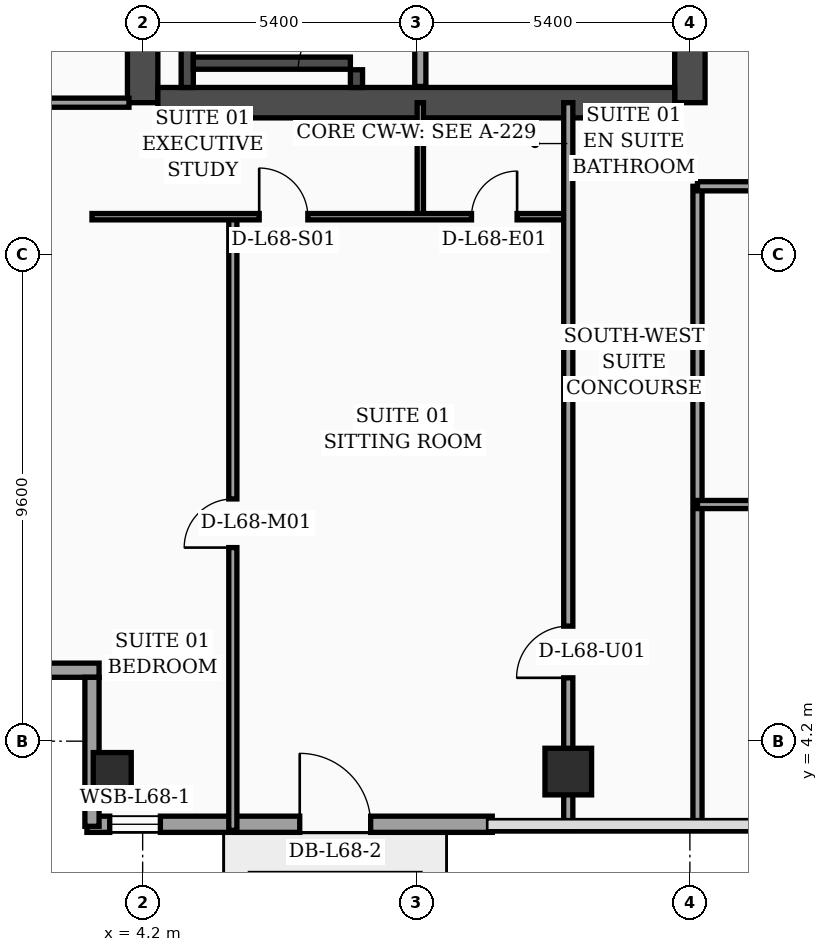
"""IFC4 building model, lengths in metres.
Left out: names, types, materials, properties, quantities, classifications, styles, units other than length and angle.
Written with IfcOpenShell. Run it as: python <this file> out.ifc"""

import sys

from ifc_helpers import new_model, si_unit, direction, frame, frame_2d, origin, origin_2d, place, context, subcontext, project, spatial, rectangle, hollow_rectangle, extrude, element, fill, save


model = new_model("IFC4")
c1 = context("Model", 3, precision=1e-05, world=origin(), true_north=direction((0.0, 1.0)))
c2 = subcontext(c1, "Body", "Model", "MODEL_VIEW")
j1 = project(units=[si_unit("LENGTHUNIT", "METRE"), si_unit("PLANEANGLEUNIT", "RADIAN")], contexts=[c1])
p1 = place(None, origin())
s1 = spatial("IfcSite", under=j1, at=p1, CompositionType="ELEMENT")
p2 = place(p1, origin())
s2 = spatial("IfcBuilding", under=s1, at=p2, CompositionType="ELEMENT")
p3 = place(p2, frame((0.0, 0.0, 274.9)))
s3 = spatial("IfcBuildingStorey", under=s2, at=p3, CompositionType="ELEMENT", Elevation=274.9)
p4 = place(p3, frame((4.2, 16.8, 0.0), z_axis=(0.0, 0.0, 1.0), x_axis=(0.0, 1.0, 0.0)))
e1 = element("IfcWall", 1, at=p4, inside=s3, PredefinedType="SHEAR", context=c2, shape_type="SweptSolid", body=[
    extrude(rectangle(XDim=21.6, YDim=0.6, at=frame_2d((10.8, 0.0))), origin(), (0.0, 0.0, 1.0), 3.56),
])
p5 = place(p3, frame((15.0, 16.8, 0.0), z_axis=(0.0, 0.0, 1.0), x_axis=(0.0, 1.0, 0.0)))
e2 = element("IfcWall", 2, at=p5, inside=s3, PredefinedType="SHEAR", context=c2, shape_type="SweptSolid", body=[
    extrude(rectangle(XDim=21.6, YDim=0.6, at=frame_2d((10.8, 0.0))), origin(), (0.0, 0.0, 1.0), 3.56),
])
p6 = place(p5, frame((8.65, 0.0, 0.0)))
e3 = element("IfcOpeningElement", 3, at=p6, cuts=e2, PredefinedType="OPENING", context=c2, shape_type="SweptSolid", body=[
    extrude(rectangle(XDim=1.1, YDim=2.2, at=frame_2d((0.55, 1.1))), frame((0.0, 0.31, 0.0), z_axis=(0.0, -1.0, 0.0), x_axis=(1.0, 0.0, 0.0)), (0.0, 0.0, 1.0), 0.62),
])
p7 = place(p5, frame((18.9, 0.0, 0.0)))
e4 = element("IfcOpeningElement", 4, at=p7, cuts=e2, PredefinedType="OPENING", context=c2, shape_type="SweptSolid", body=[
    extrude(rectangle(XDim=1.1, YDim=2.2, at=frame_2d((0.55, 1.1))), frame((0.0, 0.31, 0.0), z_axis=(0.0, -1.0, 0.0), x_axis=(1.0, 0.0, 0.0)), (0.0, 0.0, 1.0), 0.62),
])
p8 = place(p3, frame((4.5, 16.8, 0.0), z_axis=(0.0, 0.0, 1.0), x_axis=(1.0, 0.0, 0.0)))
e5 = element("IfcWall", 5, at=p8, inside=s3, PredefinedType="SHEAR", context=c2, shape_type="SweptSolid", body=[
    extrude(rectangle(XDim=10.2, YDim=0.6, at=frame_2d((5.1, 0.0))), origin(), (0.0, 0.0, 1.0), 3.56),
])
p9 = place(p3, frame((5.08, 17.1, 0.0), z_axis=(0.0, 0.0, 1.0), x_axis=(0.0, 1.0, 0.0)))
e6 = element("IfcWall", 6, at=p9, inside=s3, PredefinedType="SOLIDWALL", context=c2, shape_type="SweptSolid", body=[
    extrude(rectangle(XDim=9.69, YDim=0.24, at=frame_2d((4.845, 0.0))), origin(), (0.0, 0.0, 1.0), 3.56),
])
p10 = place(p3, frame((8.42, 17.1, 0.0), z_axis=(0.0, 0.0, 1.0), x_axis=(0.0, 1.0, 0.0)))
e7 = element("IfcWall", 7, at=p10, inside=s3, PredefinedType="SOLIDWALL", context=c2, shape_type="SweptSolid", body=[
    extrude(rectangle(XDim=9.69, YDim=0.24, at=frame_2d((4.845, 0.0))), origin(), (0.0, 0.0, 1.0), 3.56),
])
p11 = place(p10, frame((0.35, 0.0, 0.0)))
e8 = element("IfcOpeningElement", 8, at=p11, cuts=e7, PredefinedType="OPENING", context=c2, shape_type="SweptSolid", body=[
    extrude(rectangle(XDim=1.15, YDim=2.2, at=frame_2d((0.575, 1.1))), frame((0.0, 0.13, 0.0), z_axis=(0.0, -1.0, 0.0), x_axis=(1.0, 0.0, 0.0)), (0.0, 0.0, 1.0), 0.26),
])
p12 = place(p3, frame((5.2, 17.58, 0.0), z_axis=(0.0, 0.0, 1.0), x_axis=(1.0, 0.0, 0.0)))
e9 = element("IfcWall", 9, at=p12, inside=s3, PredefinedType="SOLIDWALL", context=c2, shape_type="SweptSolid", body=[
    extrude(rectangle(XDim=3.1, YDim=0.24, at=frame_2d((1.55, 0.0))), origin(), (0.0, 0.0, 1.0), 3.56),
])
p13 = place(p3, frame((3.6, 3.6, 0.0), z_axis=(0.0, 0.0, 1.0), x_axis=(1.0, 0.0, 0.0)))
e10 = element("IfcColumn", 10, at=p13, inside=s3, PredefinedType="COLUMN", context=c2, shape_type="SweptSolid", body=[
    extrude(hollow_rectangle(XDim=0.75, YDim=0.75, WallThickness=0.032, at=origin_2d()), origin(), (0.0, 0.0, 1.0), 3.56),
])
p14 = place(p3, frame((12.6, 3.6, 0.0), z_axis=(0.0, 0.0, 1.0), x_axis=(1.0, 0.0, 0.0)))
e11 = element("IfcColumn", 11, at=p14, inside=s3, PredefinedType="COLUMN", context=c2, shape_type="SweptSolid", body=[
    extrude(rectangle(XDim=0.92, YDim=0.92, at=origin_2d()), origin(), (0.0, 0.0, 1.0), 3.56),
])
p15 = place(p3, frame((3.1, 2.56, 0.0), z_axis=(0.0, 0.0, 1.0), x_axis=(1.0, 0.0, 0.0)))
e12 = element("IfcWall", 12, at=p15, inside=s3, PredefinedType="SOLIDWALL", context=c2, shape_type="SweptSolid", body=[
    extrude(rectangle(XDim=8.0, YDim=0.32, at=frame_2d((4.0, 0.0))), origin(), (0.0, 0.0, 1.0), 3.56),
])
p16 = place(p15, frame((0.45, 0.0, 0.75)))
e13 = element("IfcOpeningElement", 13, at=p16, cuts=e12, PredefinedType="OPENING", context=c2, shape_type="SweptSolid", body=[
    extrude(rectangle(XDim=1.0, YDim=1.6, at=frame_2d((0.5, 0.8))), frame((0.0, 0.17, 0.0), z_axis=(0.0, -1.0, 0.0), x_axis=(1.0, 0.0, 0.0)), (0.0, 0.0, 1.0), 0.34),
])
p17 = place(p15, frame((4.2, 0.0, 0.0)))
e14 = element("IfcOpeningElement", 14, at=p17, cuts=e12, PredefinedType="OPENING", context=c2, shape_type="SweptSolid", body=[
    extrude(rectangle(XDim=1.4, YDim=2.25, at=frame_2d((0.7, 1.125))), frame((0.0, 0.17, 0.0), z_axis=(0.0, -1.0, 0.0), x_axis=(1.0, 0.0, 0.0)), (0.0, 0.0, 1.0), 0.34),
])
p18 = place(p3, frame((0.12, 5.6, 0.0), z_axis=(0.0, 0.0, 1.0), x_axis=(1.0, 0.0, 0.0)))
e15 = element("IfcWall", 15, at=p18, inside=s3, PredefinedType="SOLIDWALL", context=c2, shape_type="SweptSolid", body=[
    extrude(rectangle(XDim=3.22, YDim=0.28, at=frame_2d((1.61, 0.0))), origin(), (0.0, 0.0, 1.0), 2.99),
])
p19 = place(p3, frame((3.2, 5.46, 0.0), z_axis=(0.0, 0.0, 1.0), x_axis=(0.0, -1.0, 0.0)))
e16 = element("IfcWall", 16, at=p19, inside=s3, PredefinedType="SOLIDWALL", context=c2, shape_type="SweptSolid", body=[
    extrude(rectangle(XDim=2.94, YDim=0.28, at=frame_2d((1.47, 0.0))), origin(), (0.0, 0.0, 1.0), 2.99),
])
p20 = place(p3, frame((9.68, 17.12, 0.0), z_axis=(0.0, 0.0, 1.0), x_axis=(0.0, 1.0, 0.0)))
e17 = element("IfcWall", 17, at=p20, inside=s3, PredefinedType="SOLIDWALL", context=c2, shape_type="SweptSolid", body=[
    extrude(rectangle(XDim=7.88, YDim=0.22, at=frame_2d((3.94, 0.0))), origin(), (0.0, 0.0, 1.0), 3.56),
])
p21 = place(p3, frame((0.08, 16.8, 0.0), z_axis=(0.0, 0.0, 1.0), x_axis=(1.0, 0.0, 0.0)))
e18 = element("IfcWall", 18, at=p21, inside=s3, PredefinedType="PARTITIONING", context=c2, shape_type="SweptSolid", body=[
    extrude(rectangle(XDim=3.85, YDim=0.18, at=frame_2d((1.925, 0.0))), origin(), (0.0, 0.0, 1.0), 2.99),
])
p22 = place(p3, frame((9.68, 14.55, 0.0), z_axis=(0.0, 0.0, 1.0), x_axis=(0.0, 1.0, 0.0)))
e19 = element("IfcWall", 19, at=p22, inside=s3, PredefinedType="PARTITIONING", context=c2, shape_type="SweptSolid", body=[
    extrude(rectangle(XDim=2.25, YDim=0.125, at=frame_2d((1.125, 0.0))), origin(), (0.0, 0.0, 1.0), 3.56),
])
p23 = place(p3, frame((5.98, 2.44, 0.0), z_axis=(0.0, 0.0, 1.0), x_axis=(0.0, 1.0, 0.0)))
e20 = element("IfcWall", 20, at=p23, inside=s3, PredefinedType="PARTITIONING", context=c2, shape_type="SweptSolid", body=[
    extrude(rectangle(XDim=12.11, YDim=0.16, at=frame_2d((6.055, 0.0))), origin(), (0.0, 0.0, 1.0), 3.09),
])
p24 = place(p23, frame((5.58, 0.0, 0.0)))
e21 = element("IfcOpeningElement", 21, at=p24, cuts=e20, PredefinedType="OPENING", context=c2, shape_type="SweptSolid", body=[
    extrude(rectangle(XDim=0.96, YDim=2.2, at=frame_2d((0.48, 1.1))), frame((0.0, 0.09, 0.0), z_axis=(0.0, -1.0, 0.0), x_axis=(1.0, 0.0, 0.0)), (0.0, 0.0, 1.0), 0.18),
])
p25 = place(p3, frame((3.2, 14.55, 0.0), z_axis=(0.0, 0.0, 1.0), x_axis=(1.0, 0.0, 0.0)))
e22 = element("IfcWall", 22, at=p25, inside=s3, PredefinedType="PARTITIONING", context=c2, shape_type="SweptSolid", body=[
    extrude(rectangle(XDim=9.4, YDim=0.125, at=frame_2d((4.7, 0.0))), origin(), (0.0, 0.0, 1.0), 2.99),
])
p26 = place(p25, frame((3.3, 0.0, 0.0)))
e23 = element("IfcOpeningElement", 23, at=p26, cuts=e22, PredefinedType="OPENING", context=c2, shape_type="SweptSolid", body=[
    extrude(rectangle(XDim=0.96, YDim=2.2, at=frame_2d((0.48, 1.1))), frame((0.0, 0.073, 0.0), z_axis=(0.0, -1.0, 0.0), x_axis=(1.0, 0.0, 0.0)), (0.0, 0.0, 1.0), 0.145),
])
p27 = place(p25, frame((7.49, 0.0, 0.0)))
e24 = element("IfcOpeningElement", 24, at=p27, cuts=e22, PredefinedType="OPENING", context=c2, shape_type="SweptSolid", body=[
    extrude(rectangle(XDim=0.9, YDim=2.15, at=frame_2d((0.45, 1.075))), frame((0.0, 0.073, 0.0), z_axis=(0.0, -1.0, 0.0), x_axis=(1.0, 0.0, 0.0)), (0.0, 0.0, 1.0), 0.145),
])
p28 = place(p3, frame((12.6, 2.44, 0.0), z_axis=(0.0, 0.0, 1.0), x_axis=(0.0, 1.0, 0.0)))
e25 = element("IfcWall", 25, at=p28, inside=s3, PredefinedType="PARTITIONING", context=c2, shape_type="SweptSolid", body=[
    extrude(rectangle(XDim=14.36, YDim=0.18, at=frame_2d((7.18, 0.0))), origin(), (0.0, 0.0, 1.0), 2.99),
])
p29 = place(p28, frame((3.01, 0.0, 0.0)))
e26 = element("IfcOpeningElement", 26, at=p29, cuts=e25, PredefinedType="OPENING", context=c2, shape_type="SweptSolid", body=[
    extrude(rectangle(XDim=1.02, YDim=2.2, at=frame_2d((0.51, 1.1))), frame((0.0, 0.1, 0.0), z_axis=(0.0, -1.0, 0.0), x_axis=(1.0, 0.0, 0.0)), (0.0, 0.0, 1.0), 0.2),
])
p30 = place(p3, frame((15.15, 2.44, 0.0), z_axis=(0.0, 0.0, 1.0), x_axis=(0.0, 1.0, 0.0)))
e27 = element("IfcWall", 27, at=p30, inside=s3, PredefinedType="PARTITIONING", context=c2, shape_type="SweptSolid", body=[
    extrude(rectangle(XDim=12.71, YDim=0.18, at=frame_2d((6.355, 0.0))), origin(), (0.0, 0.0, 1.0), 3.09),
])
p31 = place(p3, frame((15.15, 8.87, 0.0), z_axis=(0.0, 0.0, 1.0), x_axis=(1.0, 0.0, 0.0)))
e28 = element("IfcWall", 28, at=p31, inside=s3, PredefinedType="PARTITIONING", context=c2, shape_type="SweptSolid", body=[
    extrude(rectangle(XDim=4.45, YDim=0.16, at=frame_2d((2.225, 0.0))), origin(), (0.0, 0.0, 1.0), 3.56),
])
p32 = place(p31, frame((1.75, 0.0, 0.0)))
e29 = element("IfcOpeningElement", 29, at=p32, cuts=e28, PredefinedType="OPENING", context=c2, shape_type="SweptSolid", body=[
    extrude(rectangle(XDim=0.96, YDim=2.2, at=frame_2d((0.48, 1.1))), frame((0.0, 0.09, 0.0), z_axis=(0.0, -1.0, 0.0), x_axis=(1.0, 0.0, 0.0)), (0.0, 0.0, 1.0), 0.18),
])
p33 = place(p3, frame((15.15, 15.15, 0.0), z_axis=(0.0, 0.0, 1.0), x_axis=(1.0, 0.0, 0.0)))
e30 = element("IfcWall", 30, at=p33, inside=s3, PredefinedType="PARTITIONING", context=c2, shape_type="SweptSolid", body=[
    extrude(rectangle(XDim=6.45, YDim=0.18, at=frame_2d((3.225, 0.0))), origin(), (0.0, 0.0, 1.0), 2.59),
])
p34 = place(p33, frame((1.74, 0.0, 0.0)))
e31 = element("IfcOpeningElement", 31, at=p34, cuts=e30, PredefinedType="OPENING", context=c2, shape_type="SweptSolid", body=[
    extrude(rectangle(XDim=1.02, YDim=2.2, at=frame_2d((0.51, 1.1))), frame((0.0, 0.1, 0.0), z_axis=(0.0, -1.0, 0.0), x_axis=(1.0, 0.0, 0.0)), (0.0, 0.0, 1.0), 0.2),
])
p35 = place(p16, origin())
e32 = element("IfcWindow", 32, at=p35, inside=s3, PartitioningType="SINGLE_PANEL", PredefinedType="WINDOW", context=c2, shape_type="SweptSolid", body=[
    extrude(rectangle(XDim=1.0, YDim=1.6, at=frame_2d((0.5, 0.8))), frame((0.0, 0.03, 0.0), z_axis=(0.0, -1.0, 0.0), x_axis=(1.0, 0.0, 0.0)), (0.0, 0.0, 1.0), 0.06),
])
fill(e13, e32)
p36 = place(p17, origin())
e33 = element("IfcDoor", 33, at=p36, inside=s3, OperationType="SINGLE_SWING_LEFT", PredefinedType="DOOR", context=c2, shape_type="SweptSolid", body=[
    extrude(rectangle(XDim=1.4, YDim=2.25, at=frame_2d((0.7, 1.125))), frame((0.0, 0.025, 0.0), z_axis=(0.0, -1.0, 0.0), x_axis=(1.0, 0.0, 0.0)), (0.0, 0.0, 1.0), 0.05),
])
fill(e14, e33)
p37 = place(p24, origin())
e34 = element("IfcDoor", 34, at=p37, inside=s3, OperationType="SINGLE_SWING_LEFT", PredefinedType="DOOR", context=c2, shape_type="SweptSolid", body=[
    extrude(rectangle(XDim=0.96, YDim=2.2, at=frame_2d((0.48, 1.1))), frame((0.0, 0.025, 0.0), z_axis=(0.0, -1.0, 0.0), x_axis=(1.0, 0.0, 0.0)), (0.0, 0.0, 1.0), 0.05),
])
fill(e21, e34)
p38 = place(p26, origin())
e35 = element("IfcDoor", 35, at=p38, inside=s3, OperationType="SINGLE_SWING_LEFT", PredefinedType="DOOR", context=c2, shape_type="SweptSolid", body=[
    extrude(rectangle(XDim=0.96, YDim=2.2, at=frame_2d((0.48, 1.1))), frame((0.0, 0.025, 0.0), z_axis=(0.0, -1.0, 0.0), x_axis=(1.0, 0.0, 0.0)), (0.0, 0.0, 1.0), 0.05),
])
fill(e23, e35)
p39 = place(p27, origin())
e36 = element("IfcDoor", 36, at=p39, inside=s3, OperationType="SINGLE_SWING_RIGHT", PredefinedType="DOOR", context=c2, shape_type="SweptSolid", body=[
    extrude(rectangle(XDim=0.9, YDim=2.15, at=frame_2d((0.45, 1.075))), frame((0.0, 0.025, 0.0), z_axis=(0.0, -1.0, 0.0), x_axis=(1.0, 0.0, 0.0)), (0.0, 0.0, 1.0), 0.05),
])
fill(e24, e36)
p40 = place(p29, origin())
e37 = element("IfcDoor", 37, at=p40, inside=s3, OperationType="SINGLE_SWING_LEFT", PredefinedType="DOOR", context=c2, shape_type="SweptSolid", body=[
    extrude(rectangle(XDim=1.02, YDim=2.2, at=frame_2d((0.51, 1.1))), frame((0.0, 0.025, 0.0), z_axis=(0.0, -1.0, 0.0), x_axis=(1.0, 0.0, 0.0)), (0.0, 0.0, 1.0), 0.05),
])
fill(e26, e37)
p41 = place(p11, origin())
e38 = element("IfcDoor", 38, at=p41, inside=s3, OperationType="SINGLE_SWING_LEFT", PredefinedType="DOOR", context=c2, shape_type="SweptSolid", body=[
    extrude(rectangle(XDim=1.15, YDim=2.2, at=frame_2d((0.575, 1.1))), frame((0.0, 0.025, 0.0), z_axis=(0.0, -1.0, 0.0), x_axis=(1.0, 0.0, 0.0)), (0.0, 0.0, 1.0), 0.05),
])
fill(e8, e38)
save(model, sys.argv[1])
